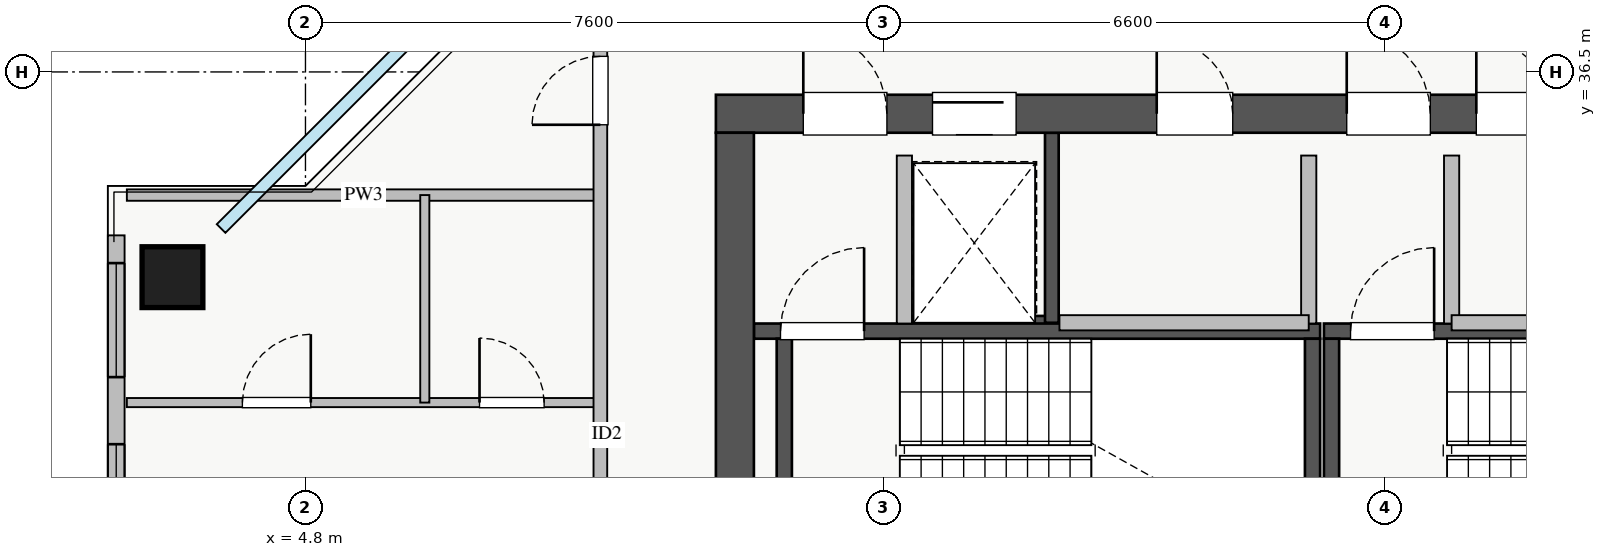
"""IFC4 building model, lengths in metres.
Left out: names, types, materials, properties, quantities, classifications, styles, units other than length and angle.
Written with IfcOpenShell. Run it as: python <this file> out.ifc"""

import sys

from ifc_helpers import new_model, si_unit, direction, frame, frame_2d, origin, origin_2d, place, context, subcontext, project, spatial, rectangle, extrude, source, transform, mapped, element, fill, save


model = new_model("IFC4")
c1 = context("Model", 3, precision=1e-05, world=origin(), true_north=direction((0.0, 1.0)))
c2 = subcontext(c1, "Body", "Model", "MODEL_VIEW")
j1 = project(units=[si_unit("LENGTHUNIT", "METRE"), si_unit("PLANEANGLEUNIT", "RADIAN")], contexts=[c1])
p1 = place(None, origin())
s1 = spatial("IfcSite", under=j1, at=p1, CompositionType="ELEMENT")
p2 = place(p1, origin())
s2 = spatial("IfcBuilding", under=s1, at=p2, CompositionType="ELEMENT")
p3 = place(p2, frame((0.0, 0.0, 213.25)))
s3 = spatial("IfcBuildingStorey", under=s2, at=p3, CompositionType="ELEMENT", Elevation=213.25)
p4 = place(p3, frame((12.68, 33.2, 0.0), z_axis=(0.0, 0.0, 1.0), x_axis=(1.0, 0.0, 0.0)))
e1 = element("IfcWall", 1, at=p4, inside=s3, PredefinedType="SHEAR", context=c2, shape_type="SweptSolid", body=[
    extrude(rectangle(XDim=1.94, YDim=0.18, at=frame_2d((0.97, 0.0))), origin(), (0.0, 0.0, 1.0), 3.07),
])
p5 = place(p3, frame((14.62, 33.2, 0.0), z_axis=(0.0, 0.0, 1.0), x_axis=(0.0, 1.0, 0.0)))
e2 = element("IfcWall", 2, at=p5, inside=s3, PredefinedType="SHEAR", context=c2, shape_type="SweptSolid", body=[
    extrude(rectangle(XDim=2.5, YDim=0.18, at=frame_2d((1.25, 0.0))), origin(), (0.0, 0.0, 1.0), 3.07),
])
p6 = place(p3, frame((10.7, 33.09, 0.0), z_axis=(0.0, 0.0, 1.0), x_axis=(1.0, 0.0, 0.0)))
e3 = element("IfcWall", 3, at=p6, inside=s3, PredefinedType="SHEAR", context=c2, shape_type="SweptSolid", body=[
    extrude(rectangle(XDim=7.45, YDim=0.2, at=frame_2d((3.725, 0.0))), origin(), (0.0, 0.0, 1.0), 3.25),
])
p7 = place(p6, frame((0.35, 0.0, 0.0)))
e4 = element("IfcOpeningElement", 4, at=p7, cuts=e3, PredefinedType="OPENING", context=c2, shape_type="SweptSolid", body=[
    extrude(rectangle(XDim=1.1, YDim=2.05, at=frame_2d((0.55, 1.025))), frame((0.0, 0.11, 0.0), z_axis=(0.0, -1.0, 0.0), x_axis=(1.0, 0.0, 0.0)), (0.0, 0.0, 1.0), 0.22),
])
for number, where, z_axis, x_axis in (
    (5, (11.1, 30.05, 0.0), (0.0, 0.0, 1.0), (0.0, 1.0, 0.0)),
    (6, (18.05, 30.05, 0.0), (0.0, 0.0, 1.0), (0.0, 1.0, 0.0)),
):
    element("IfcWall", number, at=place(p3, frame(where, z_axis=z_axis, x_axis=x_axis)), inside=s3, PredefinedType="SHEAR", context=c2, shape_type="SweptSolid", body=[
        extrude(rectangle(XDim=2.94, YDim=0.2, at=frame_2d((1.47, 0.0))), origin(), (0.0, 0.0, 1.0), 3.25),
    ])
p8 = place(p3, frame((18.2, 33.09, 0.0), z_axis=(0.0, 0.0, 1.0), x_axis=(1.0, 0.0, 0.0)))
e7 = element("IfcWall", 7, at=p8, inside=s3, PredefinedType="SHEAR", context=c2, shape_type="SweptSolid", body=[
    extrude(rectangle(XDim=7.15, YDim=0.2, at=frame_2d((3.575, 0.0))), origin(), (0.0, 0.0, 1.0), 3.25),
])
p9 = place(p8, frame((0.35, 0.0, 0.0)))
e8 = element("IfcOpeningElement", 8, at=p9, cuts=e7, PredefinedType="OPENING", context=c2, shape_type="SweptSolid", body=[
    extrude(rectangle(XDim=1.1, YDim=2.05, at=frame_2d((0.55, 1.025))), frame((0.0, 0.11, 0.0), z_axis=(0.0, -1.0, 0.0), x_axis=(1.0, 0.0, 0.0)), (0.0, 0.0, 1.0), 0.22),
])
p10 = place(p3, frame((18.3, 30.05, 0.0), z_axis=(0.0, 0.0, 1.0), x_axis=(0.0, 1.0, 0.0)))
e9 = element("IfcWall", 9, at=p10, inside=s3, PredefinedType="SHEAR", context=c2, shape_type="SweptSolid", body=[
    extrude(rectangle(XDim=2.94, YDim=0.2, at=frame_2d((1.47, 0.0))), origin(), (0.0, 0.0, 1.0), 3.25),
])
p11 = place(p3, frame((10.2, 35.95, 0.0), z_axis=(0.0, 0.0, 1.0), x_axis=(1.0, 0.0, 0.0)))
e10 = element("IfcWall", 10, at=p11, inside=s3, PredefinedType="SHEAR", context=c2, shape_type="SweptSolid", body=[
    extrude(rectangle(XDim=17.6, YDim=0.5, at=frame_2d((8.8, 0.0))), origin(), (0.0, 0.0, 1.0), 3.25),
])
p12 = place(p11, frame((1.15, 0.0, 0.0)))
e11 = element("IfcOpeningElement", 11, at=p12, cuts=e10, PredefinedType="OPENING", context=c2, shape_type="SweptSolid", body=[
    extrude(rectangle(XDim=1.1, YDim=2.05, at=frame_2d((0.55, 1.025))), frame((0.0, 0.26, 0.0), z_axis=(0.0, -1.0, 0.0), x_axis=(1.0, 0.0, 0.0)), (0.0, 0.0, 1.0), 0.52),
])
p13 = place(p11, frame((8.3, 0.0, 0.0)))
e12 = element("IfcOpeningElement", 12, at=p13, cuts=e10, PredefinedType="OPENING", context=c2, shape_type="SweptSolid", body=[
    extrude(rectangle(XDim=1.1, YDim=2.05, at=frame_2d((0.55, 1.025))), frame((0.0, 0.26, 0.0), z_axis=(0.0, -1.0, 0.0), x_axis=(1.0, 0.0, 0.0)), (0.0, 0.0, 1.0), 0.52),
])
p14 = place(p11, frame((2.85, 0.0, 0.0)))
e13 = element("IfcOpeningElement", 13, at=p14, cuts=e10, PredefinedType="OPENING", context=c2, shape_type="SweptSolid", body=[
    extrude(rectangle(XDim=1.1, YDim=2.05, at=frame_2d((0.55, 1.025))), frame((0.0, 0.26, 0.0), z_axis=(0.0, -1.0, 0.0), x_axis=(1.0, 0.0, 0.0)), (0.0, 0.0, 1.0), 0.52),
])
p15 = place(p11, frame((5.8, 0.0, 0.0)))
e14 = element("IfcOpeningElement", 14, at=p15, cuts=e10, PredefinedType="OPENING", context=c2, shape_type="SweptSolid", body=[
    extrude(rectangle(XDim=1.0, YDim=2.05, at=frame_2d((0.5, 1.025))), frame((0.0, 0.26, 0.0), z_axis=(0.0, -1.0, 0.0), x_axis=(1.0, 0.0, 0.0)), (0.0, 0.0, 1.0), 0.52),
])
p16 = place(p11, frame((14.74, 0.0, 0.0)))
e15 = element("IfcOpeningElement", 15, at=p16, cuts=e10, PredefinedType="OPENING", context=c2, shape_type="SweptSolid", body=[
    extrude(rectangle(XDim=1.0, YDim=2.05, at=frame_2d((0.5, 1.025))), frame((0.0, 0.26, 0.0), z_axis=(0.0, -1.0, 0.0), x_axis=(1.0, 0.0, 0.0)), (0.0, 0.0, 1.0), 0.52),
])
p17 = place(p11, frame((10.005, 0.0, 0.0)))
e16 = element("IfcOpeningElement", 16, at=p17, cuts=e10, PredefinedType="OPENING", context=c2, shape_type="SweptSolid", body=[
    extrude(rectangle(XDim=1.0, YDim=2.05, at=frame_2d((0.5, 1.025))), frame((0.0, 0.26, 0.0), z_axis=(0.0, -1.0, 0.0), x_axis=(1.0, 0.0, 0.0)), (0.0, 0.0, 1.0), 0.52),
])
p18 = place(p11, frame((11.55, 0.0, 0.0)))
e17 = element("IfcOpeningElement", 17, at=p18, cuts=e10, PredefinedType="OPENING", context=c2, shape_type="SweptSolid", body=[
    extrude(rectangle(XDim=1.0, YDim=2.05, at=frame_2d((0.5, 1.025))), frame((0.0, 0.26, 0.0), z_axis=(0.0, -1.0, 0.0), x_axis=(1.0, 0.0, 0.0)), (0.0, 0.0, 1.0), 0.52),
])
p19 = place(p11, frame((13.215, 0.0, 0.0)))
e18 = element("IfcOpeningElement", 18, at=p19, cuts=e10, PredefinedType="OPENING", context=c2, shape_type="SweptSolid", body=[
    extrude(rectangle(XDim=1.0, YDim=2.05, at=frame_2d((0.5, 1.025))), frame((0.0, 0.26, 0.0), z_axis=(0.0, -1.0, 0.0), x_axis=(1.0, 0.0, 0.0)), (0.0, 0.0, 1.0), 0.52),
])
p20 = place(p3, frame((10.45, 29.5, 0.0), z_axis=(0.0, 0.0, 1.0), x_axis=(0.0, 1.0, 0.0)))
e19 = element("IfcWall", 19, at=p20, inside=s3, PredefinedType="SHEAR", context=c2, shape_type="SweptSolid", body=[
    extrude(rectangle(XDim=6.2, YDim=0.5, at=frame_2d((3.1, 0.0))), origin(), (0.0, 0.0, 1.0), 3.25),
])
m1 = source(origin(), c2, "Body", "SweptSolid", [
    extrude(rectangle(XDim=0.8, YDim=0.8, at=origin_2d()), origin(), (0.0, 0.0, 1.0), 3.25),
])
p21 = place(p3, frame((3.05, 33.8, 0.0), z_axis=(0.0, 0.0, 1.0), x_axis=(1.0, 0.0, 0.0)))
e20 = element("IfcColumn", 20, at=p21, inside=s3, PredefinedType="COLUMN", context=c2, shape_type="MappedRepresentation", body=[
    mapped(m1, transform((0.0, 0.0, 0.0), x_axis=(1.0, 0.0, 0.0), y_axis=(0.0, 1.0, 0.0), z_axis=(0.0, 0.0, 1.0), scale=1.0)),
])
p22 = place(p3, frame((2.31, 11.65, 0.0), z_axis=(0.0, 0.0, 1.0), x_axis=(0.0, 1.0, 0.0)))
e21 = element("IfcWall", 21, at=p22, inside=s3, PredefinedType="STANDARD", context=c2, shape_type="SweptSolid", body=[
    extrude(rectangle(XDim=22.7, YDim=0.22, at=frame_2d((11.35, 0.0))), origin(), (0.0, 0.0, 1.0), 2.61),
])
p23 = place(p22, frame((12.2, 0.0, 0.0)))
e22 = element("IfcOpeningElement", 22, at=p23, cuts=e21, PredefinedType="OPENING", context=c2, shape_type="SweptSolid", body=[
    extrude(rectangle(XDim=1.2, YDim=2.1, at=frame_2d((0.6, 1.05))), frame((0.0, 0.12, 0.0), z_axis=(0.0, -1.0, 0.0), x_axis=(1.0, 0.0, 0.0)), (0.0, 0.0, 1.0), 0.24),
])
p24 = place(p22, frame((2.607, 0.0, 0.9)))
e23 = element("IfcOpeningElement", 23, at=p24, cuts=e21, PredefinedType="OPENING", context=c2, shape_type="SweptSolid", body=[
    extrude(rectangle(XDim=1.8, YDim=1.5, at=frame_2d((0.9, 0.75))), frame((0.0, 0.12, 0.0), z_axis=(0.0, -1.0, 0.0), x_axis=(1.0, 0.0, 0.0)), (0.0, 0.0, 1.0), 0.24),
])
p25 = place(p22, frame((17.853, 0.0, 0.9)))
e24 = element("IfcOpeningElement", 24, at=p25, cuts=e21, PredefinedType="OPENING", context=c2, shape_type="SweptSolid", body=[
    extrude(rectangle(XDim=2.1, YDim=1.5, at=frame_2d((1.05, 0.75))), frame((0.0, 0.12, 0.0), z_axis=(0.0, -1.0, 0.0), x_axis=(1.0, 0.0, 0.0)), (0.0, 0.0, 1.0), 0.24),
])
p26 = place(p22, frame((0.385, 0.0, 0.9)))
e25 = element("IfcOpeningElement", 25, at=p26, cuts=e21, PredefinedType="OPENING", context=c2, shape_type="SweptSolid", body=[
    extrude(rectangle(XDim=1.5, YDim=1.5, at=frame_2d((0.75, 0.75))), frame((0.0, 0.12, 0.0), z_axis=(0.0, -1.0, 0.0), x_axis=(1.0, 0.0, 0.0)), (0.0, 0.0, 1.0), 0.24),
])
p27 = place(p22, frame((20.835, 0.0, 0.9)))
e26 = element("IfcOpeningElement", 26, at=p27, cuts=e21, PredefinedType="OPENING", context=c2, shape_type="SweptSolid", body=[
    extrude(rectangle(XDim=1.5, YDim=1.5, at=frame_2d((0.75, 0.75))), frame((0.0, 0.12, 0.0), z_axis=(0.0, -1.0, 0.0), x_axis=(1.0, 0.0, 0.0)), (0.0, 0.0, 1.0), 0.24),
])
p28 = place(p22, frame((5.025, 0.0, 0.9)))
e27 = element("IfcOpeningElement", 27, at=p28, cuts=e21, PredefinedType="OPENING", context=c2, shape_type="SweptSolid", body=[
    extrude(rectangle(XDim=0.9, YDim=1.2, at=frame_2d((0.45, 0.6))), frame((0.0, 0.12, 0.0), z_axis=(0.0, -1.0, 0.0), x_axis=(1.0, 0.0, 0.0)), (0.0, 0.0, 1.0), 0.24),
])
for number, where, z_axis, x_axis in (
    (28, (12.68, 33.19, 0.0), (0.0, 0.0, 1.0), (0.0, 1.0, 0.0)),
    (29, (18.0, 33.19, 0.0), (0.0, 0.0, 1.0), (0.0, 1.0, 0.0)),
    (30, (19.88, 33.19, 0.0), (0.0, 0.0, 1.0), (0.0, 1.0, 0.0)),
):
    element("IfcWall", number, at=place(p3, frame(where, z_axis=z_axis, x_axis=x_axis)), inside=s3, PredefinedType="PARTITIONING", context=c2, shape_type="SweptSolid", body=[
        extrude(rectangle(XDim=2.21, YDim=0.2, at=frame_2d((1.105, 0.0))), origin(), (0.0, 0.0, 1.0), 3.07),
    ])
p29 = place(p3, frame((14.72, 33.2, 0.0), z_axis=(0.0, 0.0, 1.0), x_axis=(1.0, 0.0, 0.0)))
e31 = element("IfcWall", 31, at=p29, inside=s3, PredefinedType="PARTITIONING", context=c2, shape_type="SweptSolid", body=[
    extrude(rectangle(XDim=3.28, YDim=0.2, at=frame_2d((1.64, 0.0))), origin(), (0.0, 0.0, 1.0), 3.07),
])
p30 = place(p3, frame((19.88, 33.2, 0.0), z_axis=(0.0, 0.0, 1.0), x_axis=(1.0, 0.0, 0.0)))
e32 = element("IfcWall", 32, at=p30, inside=s3, PredefinedType="PARTITIONING", context=c2, shape_type="SweptSolid", body=[
    extrude(rectangle(XDim=1.87, YDim=0.2, at=frame_2d((0.935, 0.0))), origin(), (0.0, 0.0, 1.0), 3.07),
])
p31 = place(p3, frame((2.45, 34.88, 0.0), z_axis=(0.0, 0.0, 1.0), x_axis=(1.0, 0.0, 0.0)))
e33 = element("IfcWall", 33, at=p31, inside=s3, PredefinedType="PARTITIONING", context=c2, shape_type="SweptSolid", body=[
    extrude(rectangle(XDim=6.23, YDim=0.15, at=frame_2d((3.115, 0.0))), origin(), (0.0, 0.0, 1.0), 3.07),
])
p32 = place(p3, frame((2.45, 32.15, 0.0), z_axis=(0.0, 0.0, 1.0), x_axis=(1.0, 0.0, 0.0)))
e34 = element("IfcWall", 34, at=p32, inside=s3, PredefinedType="PLUMBINGWALL", context=c2, shape_type="SweptSolid", body=[
    extrude(rectangle(XDim=6.23, YDim=0.12, at=frame_2d((3.115, 0.0))), origin(), (0.0, 0.0, 1.0), 3.07),
])
p33 = place(p32, frame((1.52, 0.0, 0.0)))
e35 = element("IfcOpeningElement", 35, at=p33, cuts=e34, PredefinedType="OPENING", context=c2, shape_type="SweptSolid", body=[
    extrude(rectangle(XDim=0.9, YDim=2.05, at=frame_2d((0.45, 1.025))), frame((0.0, 0.07, 0.0), z_axis=(0.0, -1.0, 0.0), x_axis=(1.0, 0.0, 0.0)), (0.0, 0.0, 1.0), 0.14),
])
p34 = place(p32, frame((4.64, 0.0, 0.0)))
e36 = element("IfcOpeningElement", 36, at=p34, cuts=e34, PredefinedType="OPENING", context=c2, shape_type="SweptSolid", body=[
    extrude(rectangle(XDim=0.85, YDim=2.05, at=frame_2d((0.425, 1.025))), frame((0.0, 0.07, 0.0), z_axis=(0.0, -1.0, 0.0), x_axis=(1.0, 0.0, 0.0)), (0.0, 0.0, 1.0), 0.14),
])
p35 = place(p3, frame((6.37, 32.15, 0.0), z_axis=(0.0, 0.0, 1.0), x_axis=(0.0, 1.0, 0.0)))
e37 = element("IfcWall", 37, at=p35, inside=s3, PredefinedType="PLUMBINGWALL", context=c2, shape_type="SweptSolid", body=[
    extrude(rectangle(XDim=2.73, YDim=0.12, at=frame_2d((1.365, 0.0))), origin(), (0.0, 0.0, 1.0), 3.07),
])
p36 = place(p3, frame((8.68, 6.2, 0.0), z_axis=(0.0, 0.0, 1.0), x_axis=(0.0, 1.0, 0.0)))
e38 = element("IfcWall", 38, at=p36, inside=s3, PredefinedType="PARTITIONING", context=c2, shape_type="SweptSolid", body=[
    extrude(rectangle(XDim=33.6, YDim=0.18, at=frame_2d((16.8, 0.0))), origin(), (0.0, 0.0, 1.0), 3.07),
])
p37 = place(p36, frame((29.605, 0.0, 0.0)))
e39 = element("IfcOpeningElement", 39, at=p37, cuts=e38, PredefinedType="OPENING", context=c2, shape_type="SweptSolid", body=[
    extrude(rectangle(XDim=0.9, YDim=2.05, at=frame_2d((0.45, 1.025))), frame((0.0, 0.1, 0.0), z_axis=(0.0, -1.0, 0.0), x_axis=(1.0, 0.0, 0.0)), (0.0, 0.0, 1.0), 0.2),
])
p38 = place(p36, frame((2.92, 0.0, 0.0)))
e40 = element("IfcOpeningElement", 40, at=p38, cuts=e38, PredefinedType="OPENING", context=c2, shape_type="SweptSolid", body=[
    extrude(rectangle(XDim=0.9, YDim=2.05, at=frame_2d((0.45, 1.025))), frame((0.0, 0.1, 0.0), z_axis=(0.0, -1.0, 0.0), x_axis=(1.0, 0.0, 0.0)), (0.0, 0.0, 1.0), 0.2),
])
p39 = place(p36, frame((5.615, 0.0, 0.0)))
e41 = element("IfcOpeningElement", 41, at=p39, cuts=e38, PredefinedType="OPENING", context=c2, shape_type="SweptSolid", body=[
    extrude(rectangle(XDim=1.0, YDim=2.05, at=frame_2d((0.5, 1.025))), frame((0.0, 0.1, 0.0), z_axis=(0.0, -1.0, 0.0), x_axis=(1.0, 0.0, 0.0)), (0.0, 0.0, 1.0), 0.2),
])
p40 = place(p36, frame((10.54, 0.0, 0.0)))
e42 = element("IfcOpeningElement", 42, at=p40, cuts=e38, PredefinedType="OPENING", context=c2, shape_type="SweptSolid", body=[
    extrude(rectangle(XDim=1.0, YDim=2.05, at=frame_2d((0.5, 1.025))), frame((0.0, 0.1, 0.0), z_axis=(0.0, -1.0, 0.0), x_axis=(1.0, 0.0, 0.0)), (0.0, 0.0, 1.0), 0.2),
])
p41 = place(p36, frame((19.27, 0.0, 0.0)))
e43 = element("IfcOpeningElement", 43, at=p41, cuts=e38, PredefinedType="OPENING", context=c2, shape_type="SweptSolid", body=[
    extrude(rectangle(XDim=1.0, YDim=2.05, at=frame_2d((0.5, 1.025))), frame((0.0, 0.1, 0.0), z_axis=(0.0, -1.0, 0.0), x_axis=(1.0, 0.0, 0.0)), (0.0, 0.0, 1.0), 0.2),
])
p42 = place(p36, frame((23.655, 0.0, 0.0)))
e44 = element("IfcOpeningElement", 44, at=p42, cuts=e38, PredefinedType="OPENING", context=c2, shape_type="SweptSolid", body=[
    extrude(rectangle(XDim=1.0, YDim=2.05, at=frame_2d((0.5, 1.025))), frame((0.0, 0.1, 0.0), z_axis=(0.0, -1.0, 0.0), x_axis=(1.0, 0.0, 0.0)), (0.0, 0.0, 1.0), 0.2),
])
m2 = source(origin(), c2, "Body", "SweptSolid", [
    extrude(rectangle(XDim=2.1, YDim=1.5, at=frame_2d((1.05, 0.75))), frame((0.0, 0.03, 0.0), z_axis=(0.0, -1.0, 0.0), x_axis=(1.0, 0.0, 0.0)), (0.0, 0.0, 1.0), 0.06),
])
p43 = place(p25, origin())
e45 = element("IfcWindow", 45, at=p43, inside=s3, PartitioningType="TRIPLE_PANEL_VERTICAL", PredefinedType="WINDOW", context=c2, shape_type="MappedRepresentation", body=[
    mapped(m2, transform((0.0, 0.0, 0.0), x_axis=(1.0, 0.0, 0.0), y_axis=(0.0, 1.0, 0.0), z_axis=(0.0, 0.0, 1.0), scale=1.0)),
])
fill(e24, e45)
m3 = source(origin(), c2, "Body", "SweptSolid", [
    extrude(rectangle(XDim=1.1, YDim=2.05, at=frame_2d((0.55, 1.025))), frame((0.0, 0.025, 0.0), z_axis=(0.0, -1.0, 0.0), x_axis=(1.0, 0.0, 0.0)), (0.0, 0.0, 1.0), 0.05),
])
p44 = place(p12, origin())
e46 = element("IfcDoor", 46, at=p44, inside=s3, OperationType="SINGLE_SWING_LEFT", PredefinedType="DOOR", context=c2, shape_type="MappedRepresentation", body=[
    mapped(m3, transform((0.0, 0.0, 0.0), x_axis=(1.0, 0.0, 0.0), y_axis=(0.0, 1.0, 0.0), z_axis=(0.0, 0.0, 1.0), scale=1.0)),
])
fill(e11, e46)
p45 = place(p7, origin())
e47 = element("IfcDoor", 47, at=p45, inside=s3, OperationType="SINGLE_SWING_RIGHT", PredefinedType="DOOR", context=c2, shape_type="MappedRepresentation", body=[
    mapped(m3, transform((0.0, 0.0, 0.0), x_axis=(1.0, 0.0, 0.0), y_axis=(0.0, 1.0, 0.0), z_axis=(0.0, 0.0, 1.0), scale=1.0)),
])
fill(e4, e47)
p46 = place(p13, origin())
e48 = element("IfcDoor", 48, at=p46, inside=s3, OperationType="SINGLE_SWING_LEFT", PredefinedType="DOOR", context=c2, shape_type="MappedRepresentation", body=[
    mapped(m3, transform((0.0, 0.0, 0.0), x_axis=(1.0, 0.0, 0.0), y_axis=(0.0, 1.0, 0.0), z_axis=(0.0, 0.0, 1.0), scale=1.0)),
])
fill(e12, e48)
p47 = place(p9, origin())
e49 = element("IfcDoor", 49, at=p47, inside=s3, OperationType="SINGLE_SWING_RIGHT", PredefinedType="DOOR", context=c2, shape_type="MappedRepresentation", body=[
    mapped(m3, transform((0.0, 0.0, 0.0), x_axis=(1.0, 0.0, 0.0), y_axis=(0.0, 1.0, 0.0), z_axis=(0.0, 0.0, 1.0), scale=1.0)),
])
fill(e8, e49)
p48 = place(p14, origin())
e50 = element("IfcDoor", 50, at=p48, inside=s3, OperationType="SLIDING_TO_LEFT", PredefinedType="DOOR", context=c2, shape_type="MappedRepresentation", body=[
    mapped(m3, transform((0.0, 0.0, 0.0), x_axis=(1.0, 0.0, 0.0), y_axis=(0.0, 1.0, 0.0), z_axis=(0.0, 0.0, 1.0), scale=1.0)),
])
fill(e13, e50)
m4 = source(origin(), c2, "Body", "SweptSolid", [
    extrude(rectangle(XDim=1.0, YDim=2.05, at=frame_2d((0.5, 1.025))), frame((0.0, 0.025, 0.0), z_axis=(0.0, -1.0, 0.0), x_axis=(1.0, 0.0, 0.0)), (0.0, 0.0, 1.0), 0.05),
])
p49 = place(p15, origin())
e51 = element("IfcDoor", 51, at=p49, inside=s3, OperationType="SINGLE_SWING_LEFT", PredefinedType="DOOR", context=c2, shape_type="MappedRepresentation", body=[
    mapped(m4, transform((0.0, 0.0, 0.0), x_axis=(1.0, 0.0, 0.0), y_axis=(0.0, 1.0, 0.0), z_axis=(0.0, 0.0, 1.0), scale=1.0)),
])
fill(e14, e51)
p50 = place(p17, origin())
e52 = element("IfcDoor", 52, at=p50, inside=s3, OperationType="SINGLE_SWING_LEFT", PredefinedType="DOOR", context=c2, shape_type="MappedRepresentation", body=[
    mapped(m4, transform((0.0, 0.0, 0.0), x_axis=(1.0, 0.0, 0.0), y_axis=(0.0, 1.0, 0.0), z_axis=(0.0, 0.0, 1.0), scale=1.0)),
])
fill(e16, e52)
m5 = source(origin(), c2, "Body", "SweptSolid", [
    extrude(rectangle(XDim=0.9, YDim=2.05, at=frame_2d((0.45, 1.025))), frame((0.0, 0.025, 0.0), z_axis=(0.0, -1.0, 0.0), x_axis=(1.0, 0.0, 0.0)), (0.0, 0.0, 1.0), 0.05),
])
p51 = place(p33, origin())
e53 = element("IfcDoor", 53, at=p51, inside=s3, OperationType="SINGLE_SWING_RIGHT", PredefinedType="DOOR", context=c2, shape_type="MappedRepresentation", body=[
    mapped(m5, transform((0.0, 0.0, 0.0), x_axis=(1.0, 0.0, 0.0), y_axis=(0.0, 1.0, 0.0), z_axis=(0.0, 0.0, 1.0), scale=1.0)),
])
fill(e35, e53)
m6 = source(origin(), c2, "Body", "SweptSolid", [
    extrude(rectangle(XDim=0.85, YDim=2.05, at=frame_2d((0.425, 1.025))), frame((0.0, 0.025, 0.0), z_axis=(0.0, -1.0, 0.0), x_axis=(1.0, 0.0, 0.0)), (0.0, 0.0, 1.0), 0.05),
])
p52 = place(p34, origin())
e54 = element("IfcDoor", 54, at=p52, inside=s3, OperationType="SINGLE_SWING_LEFT", PredefinedType="DOOR", context=c2, shape_type="MappedRepresentation", body=[
    mapped(m6, transform((0.0, 0.0, 0.0), x_axis=(1.0, 0.0, 0.0), y_axis=(0.0, 1.0, 0.0), z_axis=(0.0, 0.0, 1.0), scale=1.0)),
])
fill(e36, e54)
p53 = place(p37, origin())
e55 = element("IfcDoor", 55, at=p53, inside=s3, OperationType="SINGLE_SWING_LEFT", PredefinedType="DOOR", context=c2, shape_type="MappedRepresentation", body=[
    mapped(m5, transform((0.0, 0.0, 0.0), x_axis=(1.0, 0.0, 0.0), y_axis=(0.0, 1.0, 0.0), z_axis=(0.0, 0.0, 1.0), scale=1.0)),
])
fill(e39, e55)
m7 = source(origin(), c2, "Body", "SweptSolid", [
    extrude(rectangle(XDim=1.5, YDim=1.5, at=frame_2d((0.75, 0.75))), frame((0.0, 0.03, 0.0), z_axis=(0.0, -1.0, 0.0), x_axis=(1.0, 0.0, 0.0)), (0.0, 0.0, 1.0), 0.06),
])
p54 = place(p27, origin())
e56 = element("IfcWindow", 56, at=p54, inside=s3, PartitioningType="DOUBLE_PANEL_VERTICAL", PredefinedType="WINDOW", context=c2, shape_type="MappedRepresentation", body=[
    mapped(m7, transform((0.0, 0.0, 0.0), x_axis=(1.0, 0.0, 0.0), y_axis=(0.0, 1.0, 0.0), z_axis=(0.0, 0.0, 1.0), scale=1.0)),
])
fill(e26, e56)
save(model, sys.argv[1])
